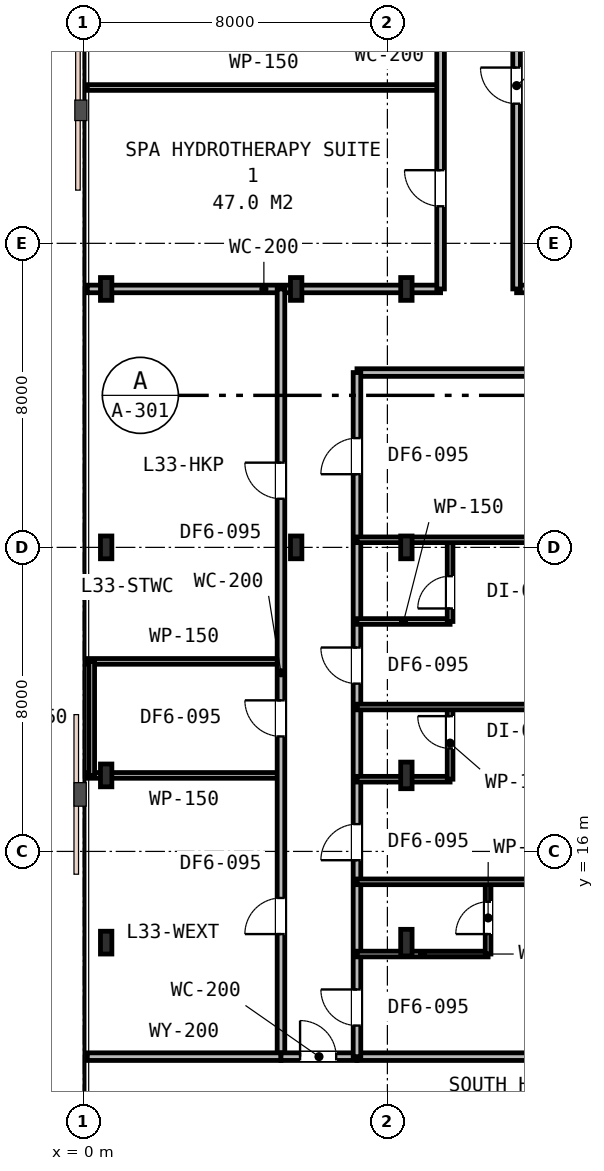
"""IFC4 building model, lengths in metres.
Left out: names, types, materials, properties, quantities, classifications, styles, units other than length and angle.
Written with IfcOpenShell. Run it as: python <this file> out.ifc"""

import sys

from ifc_helpers import new_model, si_unit, direction, frame, frame_2d, origin, origin_2d, place, context, subcontext, project, spatial, rectangle, i_section, extrude, element, fill, save


model = new_model("IFC4")
c1 = context("Model", 3, precision=1e-05, world=origin(), true_north=direction((0.0, 1.0)))
c2 = subcontext(c1, "Body", "Model", "MODEL_VIEW")
j1 = project(units=[si_unit("LENGTHUNIT", "METRE"), si_unit("PLANEANGLEUNIT", "RADIAN")], contexts=[c1])
p1 = place(None, origin())
s1 = spatial("IfcSite", under=j1, at=p1, CompositionType="ELEMENT")
p2 = place(p1, origin())
s2 = spatial("IfcBuilding", under=s1, at=p2, CompositionType="ELEMENT")
p3 = place(p2, frame((0.0, 0.0, 129.6)))
s3 = spatial("IfcBuildingStorey", under=s2, at=p3, CompositionType="ELEMENT", Elevation=129.6)
for number, where, z_axis, x_axis in (
    (1, (8.5, 24.0, 0.0), (0.0, 0.0, 1.0), (1.0, 0.0, 0.0)),
    (2, (5.6, 24.0, 0.0), (0.0, 0.0, 1.0), (1.0, 0.0, 0.0)),
    (3, (5.6, 30.8, 0.0), (0.0, 0.0, 1.0), (1.0, 0.0, 0.0)),
    (4, (8.5, 30.8, 0.0), (0.0, 0.0, 1.0), (1.0, 0.0, 0.0)),
    (5, (0.6, 24.0, 0.0), (0.0, 0.0, 1.0), (1.0, 0.0, 0.0)),
    (6, (0.6, 30.8, 0.0), (0.0, 0.0, 1.0), (1.0, 0.0, 0.0)),
    (7, (0.6, 13.6, 0.0), (0.0, 0.0, 1.0), (1.0, 0.0, 0.0)),
    (8, (0.6, 18.0, 0.0), (0.0, 0.0, 1.0), (1.0, 0.0, 0.0)),
):
    element("IfcColumn", number, at=place(p3, frame(where, z_axis=z_axis, x_axis=x_axis)), inside=s3, PredefinedType="COLUMN", context=c2, shape_type="SweptSolid", body=[
        extrude(i_section(OverallWidth=0.3, OverallDepth=0.6, WebThickness=0.015, FlangeThickness=0.03, FilletRadius=0.027, at=origin_2d()), origin(), (0.0, 0.0, 1.0), 3.6),
    ])
for number, where, z_axis, x_axis in (
    (9, (8.5, 13.6, 0.0), (0.0, 0.0, 1.0), (1.0, 0.0, 0.0)),
    (10, (8.5, 18.0, 0.0), (0.0, 0.0, 1.0), (1.0, 0.0, 0.0)),
):
    element("IfcColumn", number, at=place(p3, frame(where, z_axis=z_axis, x_axis=x_axis)), inside=s3, PredefinedType="COLUMN", context=c2, shape_type="SweptSolid", body=[
        extrude(i_section(OverallWidth=0.3, OverallDepth=0.7, WebThickness=0.017, FlangeThickness=0.032, FilletRadius=0.027, at=origin_2d()), origin(), (0.0, 0.0, 1.0), 3.6),
    ])
p4 = place(p3, frame((0.1, 30.8, 0.0), z_axis=(0.0, 0.0, 1.0), x_axis=(1.0, 0.0, 0.0)))
e11 = element("IfcWall", 11, at=p4, inside=s3, PredefinedType="PARTITIONING", context=c2, shape_type="SweptSolid", body=[
    extrude(rectangle(XDim=9.3, YDim=0.2, at=frame_2d((4.65, 0.0))), origin(), (0.0, 0.0, 1.0), 2.87),
])
p5 = place(p3, frame((7.2, 28.6, 0.0), z_axis=(0.0, 0.0, 1.0), x_axis=(1.0, 0.0, 0.0)))
e12 = element("IfcWall", 12, at=p5, inside=s3, PredefinedType="PARTITIONING", context=c2, shape_type="SweptSolid", body=[
    extrude(rectangle(XDim=37.0, YDim=0.2, at=frame_2d((18.5, 0.0))), origin(), (0.0, 0.0, 1.0), 2.87),
])
p6 = place(p5, frame((19.71, 0.0, 0.0)))
e13 = element("IfcOpeningElement", 13, at=p6, cuts=e12, PredefinedType="OPENING", context=c2, shape_type="SweptSolid", body=[
    extrude(rectangle(XDim=0.95, YDim=2.15, at=frame_2d((0.475, 1.075))), frame((0.0, 0.11, 0.0), z_axis=(0.0, -1.0, 0.0), x_axis=(1.0, 0.0, 0.0)), (0.0, 0.0, 1.0), 0.22),
])
p7 = place(p5, frame((29.78, 0.0, 0.0)))
e14 = element("IfcOpeningElement", 14, at=p7, cuts=e12, PredefinedType="OPENING", context=c2, shape_type="SweptSolid", body=[
    extrude(rectangle(XDim=0.95, YDim=2.15, at=frame_2d((0.475, 1.075))), frame((0.0, 0.11, 0.0), z_axis=(0.0, -1.0, 0.0), x_axis=(1.0, 0.0, 0.0)), (0.0, 0.0, 1.0), 0.22),
])
p8 = place(p3, frame((11.4, 30.8, 0.0), z_axis=(0.0, 0.0, 1.0), x_axis=(1.0, 0.0, 0.0)))
e15 = element("IfcWall", 15, at=p8, inside=s3, PredefinedType="PARTITIONING", context=c2, shape_type="SweptSolid", body=[
    extrude(rectangle(XDim=4.13, YDim=0.2, at=frame_2d((2.065, 0.0))), origin(), (0.0, 0.0, 1.0), 2.87),
])
p9 = place(p3, frame((0.1, 18.0, 0.0), z_axis=(0.0, 0.0, 1.0), x_axis=(1.0, 0.0, 0.0)))
e16 = element("IfcWall", 16, at=p9, inside=s3, PredefinedType="PARTITIONING", context=c2, shape_type="SweptSolid", body=[
    extrude(rectangle(XDim=5.1, YDim=0.15, at=frame_2d((2.55, 0.0))), origin(), (0.0, 0.0, 1.0), 2.87),
])
p10 = place(p3, frame((0.1, 21.0, 0.0), z_axis=(0.0, 0.0, 1.0), x_axis=(1.0, 0.0, 0.0)))
e17 = element("IfcWall", 17, at=p10, inside=s3, PredefinedType="PARTITIONING", context=c2, shape_type="SweptSolid", body=[
    extrude(rectangle(XDim=5.1, YDim=0.15, at=frame_2d((2.55, 0.0))), origin(), (0.0, 0.0, 1.0), 2.96),
])
p11 = place(p3, frame((5.2, 10.6, 0.0), z_axis=(0.0, 0.0, 1.0), x_axis=(0.0, 1.0, 0.0)))
e18 = element("IfcWall", 18, at=p11, inside=s3, PredefinedType="PARTITIONING", context=c2, shape_type="SweptSolid", body=[
    extrude(rectangle(XDim=20.2, YDim=0.2, at=frame_2d((10.1, 0.0))), origin(), (0.0, 0.0, 1.0), 2.87),
])
p12 = place(p11, frame((8.425, 0.0, 0.0)))
e19 = element("IfcOpeningElement", 19, at=p12, cuts=e18, PredefinedType="OPENING", context=c2, shape_type="SweptSolid", body=[
    extrude(rectangle(XDim=0.95, YDim=2.15, at=frame_2d((0.475, 1.075))), frame((0.0, 0.11, 0.0), z_axis=(0.0, -1.0, 0.0), x_axis=(1.0, 0.0, 0.0)), (0.0, 0.0, 1.0), 0.22),
])
p13 = place(p11, frame((14.68, 0.0, 0.0)))
e20 = element("IfcOpeningElement", 20, at=p13, cuts=e18, PredefinedType="OPENING", context=c2, shape_type="SweptSolid", body=[
    extrude(rectangle(XDim=0.95, YDim=2.15, at=frame_2d((0.475, 1.075))), frame((0.0, 0.11, 0.0), z_axis=(0.0, -1.0, 0.0), x_axis=(1.0, 0.0, 0.0)), (0.0, 0.0, 1.0), 0.22),
])
p14 = place(p11, frame((3.225, 0.0, 0.0)))
e21 = element("IfcOpeningElement", 21, at=p14, cuts=e18, PredefinedType="OPENING", context=c2, shape_type="SweptSolid", body=[
    extrude(rectangle(XDim=0.95, YDim=2.15, at=frame_2d((0.475, 1.075))), frame((0.0, 0.11, 0.0), z_axis=(0.0, -1.0, 0.0), x_axis=(1.0, 0.0, 0.0)), (0.0, 0.0, 1.0), 0.22),
])
p15 = place(p3, frame((0.22, 18.0, 0.0), z_axis=(0.0, 0.0, 1.0), x_axis=(0.0, 1.0, 0.0)))
e22 = element("IfcWall", 22, at=p15, inside=s3, PredefinedType="PARTITIONING", context=c2, shape_type="SweptSolid", body=[
    extrude(rectangle(XDim=3.0, YDim=0.15, at=frame_2d((1.5, 0.0))), origin(), (0.0, 0.0, 1.0), 2.87),
])
p16 = place(p3, frame((0.1, 36.1, 0.0), z_axis=(0.0, 0.0, 1.0), x_axis=(1.0, 0.0, 0.0)))
e23 = element("IfcWall", 23, at=p16, inside=s3, PredefinedType="PARTITIONING", context=c2, shape_type="SweptSolid", body=[
    extrude(rectangle(XDim=9.3, YDim=0.15, at=frame_2d((4.65, 0.0))), origin(), (0.0, 0.0, 1.0), 2.87),
])
p17 = place(p3, frame((9.4, 30.8, 0.0), z_axis=(0.0, 0.0, 1.0), x_axis=(0.0, 1.0, 0.0)))
e24 = element("IfcWall", 24, at=p17, inside=s3, PredefinedType="PARTITIONING", context=c2, shape_type="SweptSolid", body=[
    extrude(rectangle(XDim=10.7, YDim=0.2, at=frame_2d((5.35, 0.0))), origin(), (0.0, 0.0, 1.0), 2.87),
])
p18 = place(p17, frame((2.175, 0.0, 0.0)))
e25 = element("IfcOpeningElement", 25, at=p18, cuts=e24, PredefinedType="OPENING", context=c2, shape_type="SweptSolid", body=[
    extrude(rectangle(XDim=0.95, YDim=2.15, at=frame_2d((0.475, 1.075))), frame((0.0, 0.11, 0.0), z_axis=(0.0, -1.0, 0.0), x_axis=(1.0, 0.0, 0.0)), (0.0, 0.0, 1.0), 0.22),
])
p19 = place(p17, frame((7.525, 0.0, 0.0)))
e26 = element("IfcOpeningElement", 26, at=p19, cuts=e24, PredefinedType="OPENING", context=c2, shape_type="SweptSolid", body=[
    extrude(rectangle(XDim=0.95, YDim=2.15, at=frame_2d((0.475, 1.075))), frame((0.0, 0.11, 0.0), z_axis=(0.0, -1.0, 0.0), x_axis=(1.0, 0.0, 0.0)), (0.0, 0.0, 1.0), 0.22),
])
p20 = place(p3, frame((11.4, 30.8, 0.0), z_axis=(0.0, 0.0, 1.0), x_axis=(0.0, 1.0, 0.0)))
e27 = element("IfcWall", 27, at=p20, inside=s3, PredefinedType="PARTITIONING", context=c2, shape_type="SweptSolid", body=[
    extrude(rectangle(XDim=10.7, YDim=0.2, at=frame_2d((5.35, 0.0))), origin(), (0.0, 0.0, 1.0), 2.87),
])
p21 = place(p20, frame((4.875, 0.0, 0.0)))
e28 = element("IfcOpeningElement", 28, at=p21, cuts=e27, PredefinedType="OPENING", context=c2, shape_type="SweptSolid", body=[
    extrude(rectangle(XDim=0.95, YDim=2.15, at=frame_2d((0.475, 1.075))), frame((0.0, 0.11, 0.0), z_axis=(0.0, -1.0, 0.0), x_axis=(1.0, 0.0, 0.0)), (0.0, 0.0, 1.0), 0.22),
])
p22 = place(p3, frame((0.1, 10.6, 0.0), z_axis=(0.0, 0.0, 1.0), x_axis=(1.0, 0.0, 0.0)))
e29 = element("IfcWall", 29, at=p22, inside=s3, PredefinedType="PARTITIONING", context=c2, shape_type="SweptSolid", body=[
    extrude(rectangle(XDim=5.1, YDim=0.2, at=frame_2d((2.55, 0.0))), origin(), (0.0, 0.0, 1.0), 2.96),
])
p23 = place(p3, frame((7.2, 10.6, 0.0), z_axis=(0.0, 0.0, 1.0), x_axis=(1.0, 0.0, 0.0)))
e30 = element("IfcWall", 30, at=p23, inside=s3, PredefinedType="PARTITIONING", context=c2, shape_type="SweptSolid", body=[
    extrude(rectangle(XDim=16.7, YDim=0.2, at=frame_2d((8.35, 0.0))), origin(), (0.0, 0.0, 1.0), 2.87),
])
p24 = place(p3, frame((5.2, 10.6, 0.0), z_axis=(0.0, 0.0, 1.0), x_axis=(1.0, 0.0, 0.0)))
e31 = element("IfcWall", 31, at=p24, inside=s3, PredefinedType="PARTITIONING", context=c2, shape_type="SweptSolid", body=[
    extrude(rectangle(XDim=2.0, YDim=0.2, at=frame_2d((1.0, 0.0))), origin(), (0.0, 0.0, 1.0), 3.01),
])
p25 = place(p24, frame((0.502, 0.0, 0.0)))
e32 = element("IfcOpeningElement", 32, at=p25, cuts=e31, PredefinedType="OPENING", context=c2, shape_type="SweptSolid", body=[
    extrude(rectangle(XDim=0.95, YDim=2.15, at=frame_2d((0.475, 1.075))), frame((0.0, 0.11, 0.0), z_axis=(0.0, -1.0, 0.0), x_axis=(1.0, 0.0, 0.0)), (0.0, 0.0, 1.0), 0.22),
])
p26 = place(p3, frame((7.2, 10.6, 0.0), z_axis=(0.0, 0.0, 1.0), x_axis=(0.0, 1.0, 0.0)))
e33 = element("IfcWall", 33, at=p26, inside=s3, PredefinedType="PARTITIONING", context=c2, shape_type="SweptSolid", body=[
    extrude(rectangle(XDim=18.0, YDim=0.2, at=frame_2d((9.0, 0.0))), origin(), (0.0, 0.0, 1.0), 2.87),
])
p27 = place(p26, frame((0.818, 0.0, 0.0)))
e34 = element("IfcOpeningElement", 34, at=p27, cuts=e33, PredefinedType="OPENING", context=c2, shape_type="SweptSolid", body=[
    extrude(rectangle(XDim=0.95, YDim=2.15, at=frame_2d((0.475, 1.075))), frame((0.0, 0.11, 0.0), z_axis=(0.0, -1.0, 0.0), x_axis=(1.0, 0.0, 0.0)), (0.0, 0.0, 1.0), 0.22),
])
p28 = place(p26, frame((5.169, 0.0, 0.0)))
e35 = element("IfcOpeningElement", 35, at=p28, cuts=e33, PredefinedType="OPENING", context=c2, shape_type="SweptSolid", body=[
    extrude(rectangle(XDim=0.95, YDim=2.15, at=frame_2d((0.475, 1.075))), frame((0.0, 0.11, 0.0), z_axis=(0.0, -1.0, 0.0), x_axis=(1.0, 0.0, 0.0)), (0.0, 0.0, 1.0), 0.22),
])
p29 = place(p26, frame((9.815, 0.0, 0.0)))
e36 = element("IfcOpeningElement", 36, at=p29, cuts=e33, PredefinedType="OPENING", context=c2, shape_type="SweptSolid", body=[
    extrude(rectangle(XDim=0.95, YDim=2.15, at=frame_2d((0.475, 1.075))), frame((0.0, 0.11, 0.0), z_axis=(0.0, -1.0, 0.0), x_axis=(1.0, 0.0, 0.0)), (0.0, 0.0, 1.0), 0.22),
])
p30 = place(p26, frame((15.325, 0.0, 0.0)))
e37 = element("IfcOpeningElement", 37, at=p30, cuts=e33, PredefinedType="OPENING", context=c2, shape_type="SweptSolid", body=[
    extrude(rectangle(XDim=0.95, YDim=2.15, at=frame_2d((0.475, 1.075))), frame((0.0, 0.11, 0.0), z_axis=(0.0, -1.0, 0.0), x_axis=(1.0, 0.0, 0.0)), (0.0, 0.0, 1.0), 0.22),
])
p31 = place(p3, frame((7.2, 13.3, 0.0), z_axis=(0.0, 0.0, 1.0), x_axis=(1.0, 0.0, 0.0)))
e38 = element("IfcWall", 38, at=p31, inside=s3, PredefinedType="PARTITIONING", context=c2, shape_type="SweptSolid", body=[
    extrude(rectangle(XDim=3.45, YDim=0.15, at=frame_2d((1.725, 0.0))), origin(), (0.0, 0.0, 1.0), 2.87),
])
p32 = place(p3, frame((10.65, 13.3, 0.0), z_axis=(0.0, 0.0, 1.0), x_axis=(0.0, 1.0, 0.0)))
e39 = element("IfcWall", 39, at=p32, inside=s3, PredefinedType="PARTITIONING", context=c2, shape_type="SweptSolid", body=[
    extrude(rectangle(XDim=1.9, YDim=0.15, at=frame_2d((0.95, 0.0))), origin(), (0.0, 0.0, 1.0), 2.87),
])
p33 = place(p32, frame((0.525, 0.0, 0.0)))
e40 = element("IfcOpeningElement", 40, at=p33, cuts=e39, PredefinedType="OPENING", context=c2, shape_type="SweptSolid", body=[
    extrude(rectangle(XDim=0.85, YDim=2.15, at=frame_2d((0.425, 1.075))), frame((0.0, 0.085, 0.0), z_axis=(0.0, -1.0, 0.0), x_axis=(1.0, 0.0, 0.0)), (0.0, 0.0, 1.0), 0.17),
])
p34 = place(p3, frame((7.2, 15.2, 0.0), z_axis=(0.0, 0.0, 1.0), x_axis=(1.0, 0.0, 0.0)))
e41 = element("IfcWall", 41, at=p34, inside=s3, PredefinedType="PARTITIONING", context=c2, shape_type="SweptSolid", body=[
    extrude(rectangle(XDim=16.7, YDim=0.15, at=frame_2d((8.35, 0.0))), origin(), (0.0, 0.0, 1.0), 2.87),
])
p35 = place(p3, frame((7.2, 17.9, 0.0), z_axis=(0.0, 0.0, 1.0), x_axis=(1.0, 0.0, 0.0)))
e42 = element("IfcWall", 42, at=p35, inside=s3, PredefinedType="PARTITIONING", context=c2, shape_type="SweptSolid", body=[
    extrude(rectangle(XDim=2.45, YDim=0.15, at=frame_2d((1.225, 0.0))), origin(), (0.0, 0.0, 1.0), 2.87),
])
p36 = place(p3, frame((9.65, 17.9, 0.0), z_axis=(0.0, 0.0, 1.0), x_axis=(0.0, 1.0, 0.0)))
e43 = element("IfcWall", 43, at=p36, inside=s3, PredefinedType="PARTITIONING", context=c2, shape_type="SweptSolid", body=[
    extrude(rectangle(XDim=1.9, YDim=0.15, at=frame_2d((0.95, 0.0))), origin(), (0.0, 0.0, 1.0), 2.87),
])
p37 = place(p36, frame((0.81, 0.0, 0.0)))
e44 = element("IfcOpeningElement", 44, at=p37, cuts=e43, PredefinedType="OPENING", context=c2, shape_type="SweptSolid", body=[
    extrude(rectangle(XDim=0.85, YDim=2.15, at=frame_2d((0.425, 1.075))), frame((0.0, 0.085, 0.0), z_axis=(0.0, -1.0, 0.0), x_axis=(1.0, 0.0, 0.0)), (0.0, 0.0, 1.0), 0.17),
])
p38 = place(p3, frame((7.2, 19.8, 0.0), z_axis=(0.0, 0.0, 1.0), x_axis=(1.0, 0.0, 0.0)))
e45 = element("IfcWall", 45, at=p38, inside=s3, PredefinedType="PARTITIONING", context=c2, shape_type="SweptSolid", body=[
    extrude(rectangle(XDim=16.7, YDim=0.15, at=frame_2d((8.35, 0.0))), origin(), (0.0, 0.0, 1.0), 2.87),
])
p39 = place(p3, frame((7.2, 22.05, 0.0), z_axis=(0.0, 0.0, 1.0), x_axis=(1.0, 0.0, 0.0)))
e46 = element("IfcWall", 46, at=p39, inside=s3, PredefinedType="PARTITIONING", context=c2, shape_type="SweptSolid", body=[
    extrude(rectangle(XDim=2.45, YDim=0.15, at=frame_2d((1.225, 0.0))), origin(), (0.0, 0.0, 1.0), 2.87),
])
p40 = place(p3, frame((9.65, 22.05, 0.0), z_axis=(0.0, 0.0, 1.0), x_axis=(0.0, 1.0, 0.0)))
e47 = element("IfcWall", 47, at=p40, inside=s3, PredefinedType="PARTITIONING", context=c2, shape_type="SweptSolid", body=[
    extrude(rectangle(XDim=2.15, YDim=0.15, at=frame_2d((1.075, 0.0))), origin(), (0.0, 0.0, 1.0), 2.87),
])
p41 = place(p40, frame((0.343, 0.0, 0.0)))
e48 = element("IfcOpeningElement", 48, at=p41, cuts=e47, PredefinedType="OPENING", context=c2, shape_type="SweptSolid", body=[
    extrude(rectangle(XDim=0.85, YDim=2.15, at=frame_2d((0.425, 1.075))), frame((0.0, 0.085, 0.0), z_axis=(0.0, -1.0, 0.0), x_axis=(1.0, 0.0, 0.0)), (0.0, 0.0, 1.0), 0.17),
])
p42 = place(p3, frame((7.2, 24.2, 0.0), z_axis=(0.0, 0.0, 1.0), x_axis=(1.0, 0.0, 0.0)))
e49 = element("IfcWall", 49, at=p42, inside=s3, PredefinedType="PARTITIONING", context=c2, shape_type="SweptSolid", body=[
    extrude(rectangle(XDim=16.7, YDim=0.15, at=frame_2d((8.35, 0.0))), origin(), (0.0, 0.0, 1.0), 2.87),
])
p43 = place(p12, origin())
e50 = element("IfcDoor", 50, at=p43, inside=s3, OperationType="SINGLE_SWING_RIGHT", PredefinedType="DOOR", context=c2, shape_type="SweptSolid", body=[
    extrude(rectangle(XDim=0.95, YDim=2.15, at=frame_2d((0.475, 1.075))), frame((0.0, 0.025, 0.0), z_axis=(0.0, -1.0, 0.0), x_axis=(1.0, 0.0, 0.0)), (0.0, 0.0, 1.0), 0.05),
])
fill(e19, e50)
p44 = place(p13, origin())
e51 = element("IfcDoor", 51, at=p44, inside=s3, OperationType="SINGLE_SWING_RIGHT", PredefinedType="DOOR", context=c2, shape_type="SweptSolid", body=[
    extrude(rectangle(XDim=0.95, YDim=2.15, at=frame_2d((0.475, 1.075))), frame((0.0, 0.025, 0.0), z_axis=(0.0, -1.0, 0.0), x_axis=(1.0, 0.0, 0.0)), (0.0, 0.0, 1.0), 0.05),
])
fill(e20, e51)
p45 = place(p14, origin())
e52 = element("IfcDoor", 52, at=p45, inside=s3, OperationType="SINGLE_SWING_LEFT", PredefinedType="DOOR", context=c2, shape_type="SweptSolid", body=[
    extrude(rectangle(XDim=0.95, YDim=2.15, at=frame_2d((0.475, 1.075))), frame((0.0, 0.025, 0.0), z_axis=(0.0, -1.0, 0.0), x_axis=(1.0, 0.0, 0.0)), (0.0, 0.0, 1.0), 0.05),
])
fill(e21, e52)
p46 = place(p18, origin())
e53 = element("IfcDoor", 53, at=p46, inside=s3, OperationType="SINGLE_SWING_RIGHT", PredefinedType="DOOR", context=c2, shape_type="SweptSolid", body=[
    extrude(rectangle(XDim=0.95, YDim=2.15, at=frame_2d((0.475, 1.075))), frame((0.0, 0.025, 0.0), z_axis=(0.0, -1.0, 0.0), x_axis=(1.0, 0.0, 0.0)), (0.0, 0.0, 1.0), 0.05),
])
fill(e25, e53)
p47 = place(p21, origin())
e54 = element("IfcDoor", 54, at=p47, inside=s3, OperationType="SINGLE_SWING_RIGHT", PredefinedType="DOOR", context=c2, shape_type="SweptSolid", body=[
    extrude(rectangle(XDim=0.95, YDim=2.15, at=frame_2d((0.475, 1.075))), frame((0.0, 0.025, 0.0), z_axis=(0.0, -1.0, 0.0), x_axis=(1.0, 0.0, 0.0)), (0.0, 0.0, 1.0), 0.05),
])
fill(e28, e54)
p48 = place(p25, origin())
e55 = element("IfcDoor", 55, at=p48, inside=s3, OperationType="SINGLE_SWING_LEFT", PredefinedType="DOOR", context=c2, shape_type="SweptSolid", body=[
    extrude(rectangle(XDim=0.95, YDim=2.15, at=frame_2d((0.475, 1.075))), frame((0.0, 0.025, 0.0), z_axis=(0.0, -1.0, 0.0), x_axis=(1.0, 0.0, 0.0)), (0.0, 0.0, 1.0), 0.05),
])
fill(e32, e55)
p49 = place(p27, origin())
e56 = element("IfcDoor", 56, at=p49, inside=s3, OperationType="SINGLE_SWING_RIGHT", PredefinedType="DOOR", context=c2, shape_type="SweptSolid", body=[
    extrude(rectangle(XDim=0.95, YDim=2.15, at=frame_2d((0.475, 1.075))), frame((0.0, 0.025, 0.0), z_axis=(0.0, -1.0, 0.0), x_axis=(1.0, 0.0, 0.0)), (0.0, 0.0, 1.0), 0.05),
])
fill(e34, e56)
p50 = place(p33, origin())
e57 = element("IfcDoor", 57, at=p50, inside=s3, OperationType="SINGLE_SWING_LEFT", PredefinedType="DOOR", context=c2, shape_type="SweptSolid", body=[
    extrude(rectangle(XDim=0.85, YDim=2.15, at=frame_2d((0.425, 1.075))), frame((0.0, 0.025, 0.0), z_axis=(0.0, -1.0, 0.0), x_axis=(1.0, 0.0, 0.0)), (0.0, 0.0, 1.0), 0.05),
])
fill(e40, e57)
p51 = place(p28, origin())
e58 = element("IfcDoor", 58, at=p51, inside=s3, OperationType="SINGLE_SWING_LEFT", PredefinedType="DOOR", context=c2, shape_type="SweptSolid", body=[
    extrude(rectangle(XDim=0.95, YDim=2.15, at=frame_2d((0.475, 1.075))), frame((0.0, 0.025, 0.0), z_axis=(0.0, -1.0, 0.0), x_axis=(1.0, 0.0, 0.0)), (0.0, 0.0, 1.0), 0.05),
])
fill(e35, e58)
p52 = place(p37, origin())
e59 = element("IfcDoor", 59, at=p52, inside=s3, OperationType="SINGLE_SWING_RIGHT", PredefinedType="DOOR", context=c2, shape_type="SweptSolid", body=[
    extrude(rectangle(XDim=0.85, YDim=2.15, at=frame_2d((0.425, 1.075))), frame((0.0, 0.025, 0.0), z_axis=(0.0, -1.0, 0.0), x_axis=(1.0, 0.0, 0.0)), (0.0, 0.0, 1.0), 0.05),
])
fill(e44, e59)
p53 = place(p29, origin())
e60 = element("IfcDoor", 60, at=p53, inside=s3, OperationType="SINGLE_SWING_RIGHT", PredefinedType="DOOR", context=c2, shape_type="SweptSolid", body=[
    extrude(rectangle(XDim=0.95, YDim=2.15, at=frame_2d((0.475, 1.075))), frame((0.0, 0.025, 0.0), z_axis=(0.0, -1.0, 0.0), x_axis=(1.0, 0.0, 0.0)), (0.0, 0.0, 1.0), 0.05),
])
fill(e36, e60)
p54 = place(p41, origin())
e61 = element("IfcDoor", 61, at=p54, inside=s3, OperationType="SINGLE_SWING_LEFT", PredefinedType="DOOR", context=c2, shape_type="SweptSolid", body=[
    extrude(rectangle(XDim=0.85, YDim=2.15, at=frame_2d((0.425, 1.075))), frame((0.0, 0.025, 0.0), z_axis=(0.0, -1.0, 0.0), x_axis=(1.0, 0.0, 0.0)), (0.0, 0.0, 1.0), 0.05),
])
fill(e48, e61)
p55 = place(p30, origin())
e62 = element("IfcDoor", 62, at=p55, inside=s3, OperationType="SINGLE_SWING_LEFT", PredefinedType="DOOR", context=c2, shape_type="SweptSolid", body=[
    extrude(rectangle(XDim=0.95, YDim=2.15, at=frame_2d((0.475, 1.075))), frame((0.0, 0.025, 0.0), z_axis=(0.0, -1.0, 0.0), x_axis=(1.0, 0.0, 0.0)), (0.0, 0.0, 1.0), 0.05),
])
fill(e37, e62)
save(model, sys.argv[1])
